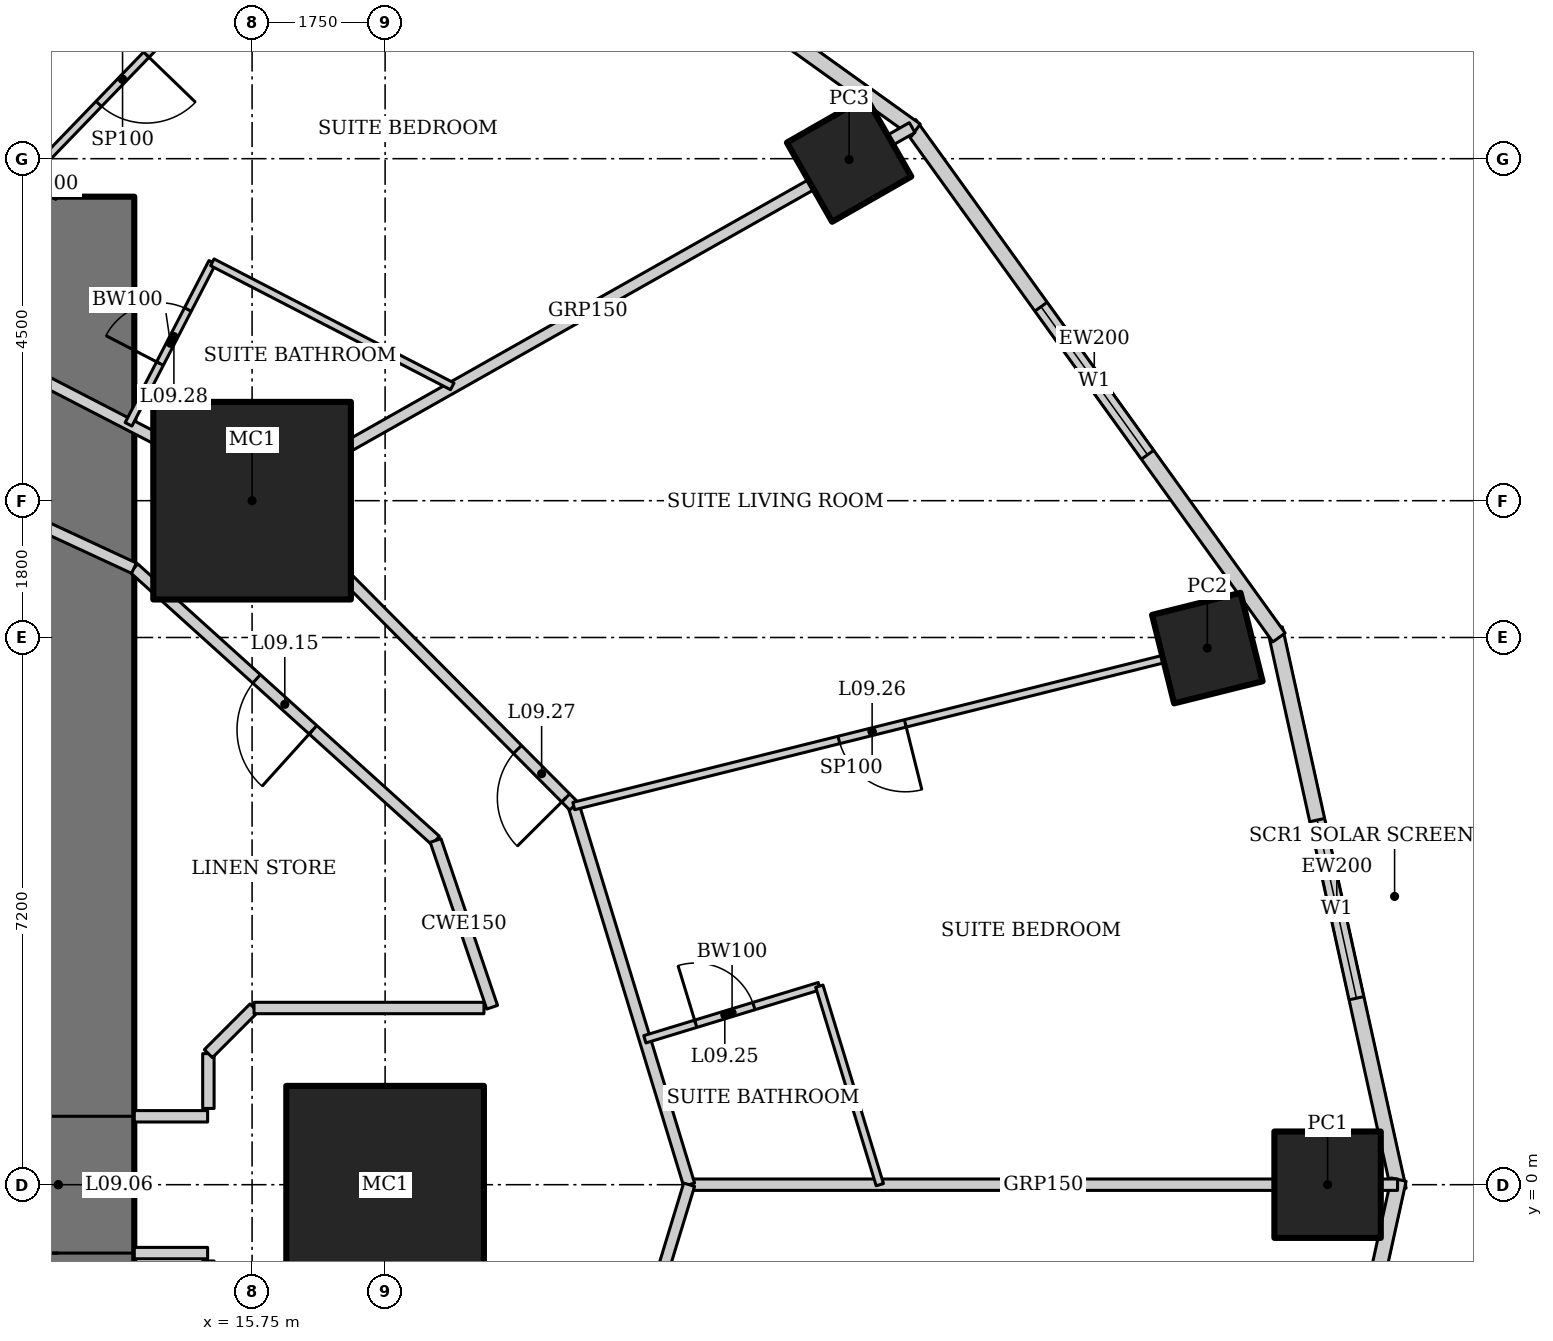
"""IFC4 building model, lengths in metres.
Left out: names, types, materials, properties, quantities, classifications, styles, units other than length and angle.
Written with IfcOpenShell. Run it as: python <this file> out.ifc"""

import sys

from ifc_helpers import new_model, si_unit, direction, frame, frame_2d, origin, origin_2d, place, context, subcontext, project, spatial, rectangle, hollow_rectangle, extrude, element, fill, save


model = new_model("IFC4")
c1 = context("Model", 3, precision=1e-05, world=origin(), true_north=direction((0.0, 1.0)))
c2 = subcontext(c1, "Body", "Model", "MODEL_VIEW")
j1 = project(units=[si_unit("LENGTHUNIT", "METRE"), si_unit("PLANEANGLEUNIT", "RADIAN")], contexts=[c1])
p1 = place(None, origin())
s1 = spatial("IfcSite", under=j1, at=p1, CompositionType="ELEMENT")
p2 = place(p1, origin())
s2 = spatial("IfcBuilding", under=s1, at=p2, CompositionType="ELEMENT")
p3 = place(p2, frame((0.0, 0.0, 47.8)))
s3 = spatial("IfcBuildingStorey", under=s2, at=p3, CompositionType="ELEMENT", Elevation=47.8)
for number, where, z_axis, x_axis in (
    (1, (17.5, 0.0, 0.0), (0.0, 0.0, 1.0), (1.0, 0.0, 0.0)),
    (2, (15.75, 9.0, 0.0), (0.0, 0.0, 1.0), (1.0, 0.0, 0.0)),
):
    element("IfcColumn", number, at=place(p3, frame(where, z_axis=z_axis, x_axis=x_axis)), inside=s3, PredefinedType="COLUMN", context=c2, shape_type="SweptSolid", body=[
        extrude(hollow_rectangle(XDim=2.6, YDim=2.6, WallThickness=0.13, at=origin_2d()), origin(), (0.0, 0.0, 1.0), 3.6),
    ])
p4 = place(p3, frame((29.9, 0.0, 0.0), z_axis=(0.0, 0.0, 1.0), x_axis=(1.0, 0.0, 0.0)))
e3 = element("IfcColumn", 3, at=p4, inside=s3, PredefinedType="COLUMN", context=c2, shape_type="SweptSolid", body=[
    extrude(hollow_rectangle(XDim=1.4, YDim=1.4, WallThickness=0.1, at=origin_2d()), origin(), (0.0, 0.0, 1.0), 3.6),
])
p5 = place(p3, frame((28.318, 7.06, 0.0), z_axis=(0.0, 0.0, 1.0), x_axis=(0.970295726276, 0.2419218956, 0.0)))
e4 = element("IfcColumn", 4, at=p5, inside=s3, PredefinedType="COLUMN", context=c2, shape_type="SweptSolid", body=[
    extrude(hollow_rectangle(XDim=1.2, YDim=1.2, WallThickness=0.1, at=origin_2d()), origin(), (0.0, 0.0, 1.0), 3.6),
])
p6 = place(p3, frame((23.605, 13.489, 0.0), z_axis=(0.0, 0.0, 1.0), x_axis=(0.86824298017, 0.496139221777, 0.0)))
e5 = element("IfcColumn", 5, at=p6, inside=s3, PredefinedType="COLUMN", context=c2, shape_type="SweptSolid", body=[
    extrude(hollow_rectangle(XDim=1.2, YDim=1.2, WallThickness=0.12, at=origin_2d()), origin(), (0.0, 0.0, 1.0), 3.6),
])
p7 = place(p3, frame((13.2, -13.0, 0.0), z_axis=(0.0, 0.0, 1.0), x_axis=(0.0, 1.0, 0.0)))
e6 = element("IfcWall", 6, at=p7, inside=s3, PredefinedType="SHEAR", context=c2, shape_type="SweptSolid", body=[
    extrude(rectangle(XDim=26.0, YDim=2.0, at=frame_2d((13.0, 0.0))), origin(), (0.0, 0.0, 1.0), 3.6),
])
p8 = place(p7, frame((12.1, 0.0, 0.0)))
e7 = element("IfcOpeningElement", 7, at=p8, cuts=e6, PredefinedType="OPENING", context=c2, shape_type="SweptSolid", body=[
    extrude(rectangle(XDim=1.8, YDim=2.1, at=frame_2d((0.9, 1.05))), frame((0.0, 1.01, 0.0), z_axis=(0.0, -1.0, 0.0), x_axis=(1.0, 0.0, 0.0)), (0.0, 0.0, 1.0), 2.02),
])
p9 = place(p3, frame((30.835, -0.067, 0.0), z_axis=(0.0, 0.0, 1.0), x_axis=(-0.215238065514, 0.976561608478, 0.0)))
e8 = element("IfcWall", 8, at=p9, inside=s3, PredefinedType="SOLIDWALL", context=c2, shape_type="SweptSolid", body=[
    extrude(rectangle(XDim=7.562, YDim=0.2, at=frame_2d((3.781, 0.0))), origin(), (0.0, 0.0, 1.0), 3.45),
])
p10 = place(p9, frame((2.581, 0.0, 0.5)))
e9 = element("IfcOpeningElement", 9, at=p10, cuts=e8, PredefinedType="OPENING", context=c2, shape_type="SweptSolid", body=[
    extrude(rectangle(XDim=2.4, YDim=2.2, at=frame_2d((1.2, 1.1))), frame((0.0, 0.11, 0.0), z_axis=(0.0, -1.0, 0.0), x_axis=(1.0, 0.0, 0.0)), (0.0, 0.0, 1.0), 0.22),
])
p11 = place(p3, frame((29.26, 7.2, 0.0), z_axis=(0.0, 0.0, 1.0), x_axis=(-0.583937613703, 0.811798536155, 0.0)))
e10 = element("IfcWall", 10, at=p11, inside=s3, PredefinedType="SOLIDWALL", context=c2, shape_type="SweptSolid", body=[
    extrude(rectangle(XDim=8.323, YDim=0.2, at=frame_2d((4.162, 0.0))), origin(), (0.0, 0.0, 1.0), 3.45),
])
p12 = place(p11, frame((2.961, 0.0, 0.5)))
e11 = element("IfcOpeningElement", 11, at=p12, cuts=e10, PredefinedType="OPENING", context=c2, shape_type="SweptSolid", body=[
    extrude(rectangle(XDim=2.4, YDim=2.2, at=frame_2d((1.2, 1.1))), frame((0.0, 0.11, 0.0), z_axis=(0.0, -1.0, 0.0), x_axis=(1.0, 0.0, 0.0)), (0.0, 0.0, 1.0), 0.22),
])
p13 = place(p3, frame((24.482, 13.875, 0.0), z_axis=(0.0, 0.0, 1.0), x_axis=(-0.812791321576, 0.582554948112, 0.0)))
e12 = element("IfcWall", 12, at=p13, inside=s3, PredefinedType="SOLIDWALL", context=c2, shape_type="SweptSolid", body=[
    extrude(rectangle(XDim=8.063, YDim=0.2, at=frame_2d((4.032, 0.0))), origin(), (0.0, 0.0, 1.0), 3.45),
])
p14 = place(p13, frame((2.832, 0.0, 0.5)))
e13 = element("IfcOpeningElement", 13, at=p14, cuts=e12, PredefinedType="OPENING", context=c2, shape_type="SweptSolid", body=[
    extrude(rectangle(XDim=2.4, YDim=2.2, at=frame_2d((1.2, 1.1))), frame((0.0, 0.11, 0.0), z_axis=(0.0, -1.0, 0.0), x_axis=(1.0, 0.0, 0.0)), (0.0, 0.0, 1.0), 0.22),
])
p15 = place(p3, frame((29.208, -7.318, 0.0), z_axis=(0.0, 0.0, 1.0), x_axis=(0.215238065514, 0.976561608478, 0.0)))
e14 = element("IfcWall", 14, at=p15, inside=s3, PredefinedType="SOLIDWALL", context=c2, shape_type="SweptSolid", body=[
    extrude(rectangle(XDim=7.562, YDim=0.2, at=frame_2d((3.781, 0.0))), origin(), (0.0, 0.0, 1.0), 3.45),
])
p16 = place(p15, frame((2.581, 0.0, 0.5)))
e15 = element("IfcOpeningElement", 15, at=p16, cuts=e14, PredefinedType="OPENING", context=c2, shape_type="SweptSolid", body=[
    extrude(rectangle(XDim=2.4, YDim=2.2, at=frame_2d((1.2, 1.1))), frame((0.0, 0.11, 0.0), z_axis=(0.0, -1.0, 0.0), x_axis=(1.0, 0.0, 0.0)), (0.0, 0.0, 1.0), 0.22),
])
p17 = place(p3, frame((30.821, 0.0, 0.0), z_axis=(0.0, 0.0, 1.0), x_axis=(-1.0, 0.0, 0.0)))
e16 = element("IfcWall", 16, at=p17, inside=s3, PredefinedType="PARTITIONING", context=c2, shape_type="SweptSolid", body=[
    extrude(rectangle(XDim=9.321, YDim=0.15, at=frame_2d((4.66, 0.0))), origin(), (0.0, 0.0, 1.0), 2.528),
])
p18 = place(p3, frame((24.435, 13.909, 0.0), z_axis=(0.0, 0.0, 1.0), x_axis=(-0.870612006791, -0.491970256856, 0.0)))
e17 = element("IfcWall", 17, at=p18, inside=s3, PredefinedType="PARTITIONING", context=c2, shape_type="SweptSolid", body=[
    extrude(rectangle(XDim=9.802, YDim=0.15, at=frame_2d((4.901, 0.0))), origin(), (0.0, 0.0, 1.0), 2.693),
])
p19 = place(p3, frame((21.5, 0.0, 0.0), z_axis=(0.0, 0.0, 1.0), x_axis=(-0.291383581394, 0.95660629754, 0.0)))
e18 = element("IfcWall", 18, at=p19, inside=s3, PredefinedType="PARTITIONING", context=c2, shape_type="SweptSolid", body=[
    extrude(rectangle(XDim=5.208, YDim=0.15, at=frame_2d((2.604, 0.0))), origin(), (0.0, 0.0, 1.0), 3.45),
])
p20 = place(p3, frame((19.982, 4.982, 0.0), z_axis=(0.0, 0.0, 1.0), x_axis=(-0.705121546414, 0.709086457904, 0.0)))
e19 = element("IfcWall", 19, at=p20, inside=s3, PredefinedType="PARTITIONING", context=c2, shape_type="SweptSolid", body=[
    extrude(rectangle(XDim=5.788, YDim=0.15, at=frame_2d((2.894, 0.0))), origin(), (0.0, 0.0, 1.0), 3.45),
])
p21 = place(p20, frame((0.15, 0.0, 0.0)))
e20 = element("IfcOpeningElement", 20, at=p21, cuts=e19, PredefinedType="OPENING", context=c2, shape_type="SweptSolid", body=[
    extrude(rectangle(XDim=0.9, YDim=2.1, at=frame_2d((0.45, 1.05))), frame((0.0, 0.085, 0.0), z_axis=(0.0, -1.0, 0.0), x_axis=(1.0, 0.0, 0.0)), (0.0, 0.0, 1.0), 0.17),
])
p22 = place(p3, frame((15.901, 9.086, 0.0), z_axis=(0.0, 0.0, 1.0), x_axis=(-0.888333171507, 0.459199495209, 0.0)))
e21 = element("IfcWall", 21, at=p22, inside=s3, PredefinedType="PARTITIONING", context=c2, shape_type="SweptSolid", body=[
    extrude(rectangle(XDim=5.351, YDim=0.15, at=frame_2d((2.676, 0.0))), origin(), (0.0, 0.0, 1.0), 3.45),
])
p23 = place(p3, frame((19.982, -4.982, 0.0), z_axis=(0.0, 0.0, 1.0), x_axis=(0.291383581394, 0.95660629754, 0.0)))
e22 = element("IfcWall", 22, at=p23, inside=s3, PredefinedType="PARTITIONING", context=c2, shape_type="SweptSolid", body=[
    extrude(rectangle(XDim=5.208, YDim=0.15, at=frame_2d((2.604, 0.0))), origin(), (0.0, 0.0, 1.0), 3.45),
])
p24 = place(p23, frame((0.15, 0.0, 0.0)))
e23 = element("IfcOpeningElement", 23, at=p24, cuts=e22, PredefinedType="OPENING", context=c2, shape_type="SweptSolid", body=[
    extrude(rectangle(XDim=0.9, YDim=2.1, at=frame_2d((0.45, 1.05))), frame((0.0, 0.085, 0.0), z_axis=(0.0, -1.0, 0.0), x_axis=(1.0, 0.0, 0.0)), (0.0, 0.0, 1.0), 0.17),
])
p25 = place(p3, frame((18.164, 4.529, 0.0), z_axis=(0.0, 0.0, 1.0), x_axis=(-0.742194222, 0.670184852731, 0.0)))
e24 = element("IfcWall", 24, at=p25, inside=s3, PredefinedType="PARTITIONING", context=c2, shape_type="SweptSolid", body=[
    extrude(rectangle(XDim=5.347, YDim=0.15, at=frame_2d((2.673, 0.0))), origin(), (0.0, 0.0, 1.0), 3.45),
])
p26 = place(p25, frame((2.173, 0.0, 0.0)))
e25 = element("IfcOpeningElement", 25, at=p26, cuts=e24, PredefinedType="OPENING", context=c2, shape_type="SweptSolid", body=[
    extrude(rectangle(XDim=1.0, YDim=2.1, at=frame_2d((0.5, 1.05))), frame((0.0, 0.085, 0.0), z_axis=(0.0, -1.0, 0.0), x_axis=(1.0, 0.0, 0.0)), (0.0, 0.0, 1.0), 0.17),
])
p27 = place(p3, frame((14.196, 8.112, 0.0), z_axis=(0.0, 0.0, 1.0), x_axis=(-0.907279653965, 0.420527798727, 0.0)))
e26 = element("IfcWall", 26, at=p27, inside=s3, PredefinedType="PARTITIONING", context=c2, shape_type="SweptSolid", body=[
    extrude(rectangle(XDim=4.844, YDim=0.15, at=frame_2d((2.422, 0.0))), origin(), (0.0, 0.0, 1.0), 3.45),
])
p28 = place(p3, frame((20.917, 1.913, 0.0), z_axis=(0.0, 0.0, 1.0), x_axis=(0.956591303063, 0.291432803411, 0.0)))
e27 = element("IfcWall", 27, at=p28, inside=s3, PredefinedType="PARTITIONING", context=c2, shape_type="SweptSolid", body=[
    extrude(rectangle(XDim=2.4, YDim=0.1, at=frame_2d((1.2, 0.0))), origin(), (0.0, 0.0, 1.0), 3.45),
])
p29 = place(p28, frame((0.7, 0.0, 0.0)))
e28 = element("IfcOpeningElement", 28, at=p29, cuts=e27, PredefinedType="OPENING", context=c2, shape_type="SweptSolid", body=[
    extrude(rectangle(XDim=0.8, YDim=2.1, at=frame_2d((0.4, 1.05))), frame((0.0, 0.06, 0.0), z_axis=(0.0, -1.0, 0.0), x_axis=(1.0, 0.0, 0.0)), (0.0, 0.0, 1.0), 0.12),
])
p30 = place(p3, frame((23.213, 2.613, 0.0), z_axis=(0.0, 0.0, 1.0), x_axis=(0.291339473488, -0.956619731757, 0.0)))
e29 = element("IfcWall", 29, at=p30, inside=s3, PredefinedType="PARTITIONING", context=c2, shape_type="SweptSolid", body=[
    extrude(rectangle(XDim=2.731, YDim=0.1, at=frame_2d((1.365, 0.0))), origin(), (0.0, 0.0, 1.0), 3.45),
])
p31 = place(p3, frame((27.833, 6.939, 0.0), z_axis=(0.0, 0.0, 1.0), x_axis=(-0.97029673161, -0.24191786339, 0.0)))
e30 = element("IfcWall", 30, at=p31, inside=s3, PredefinedType="PARTITIONING", context=c2, shape_type="SweptSolid", body=[
    extrude(rectangle(XDim=8.091, YDim=0.1, at=frame_2d((4.045, 0.0))), origin(), (0.0, 0.0, 1.0), 2.332),
])
p32 = place(p31, frame((3.595, 0.0, 0.0)))
e31 = element("IfcOpeningElement", 31, at=p32, cuts=e30, PredefinedType="OPENING", context=c2, shape_type="SweptSolid", body=[
    extrude(rectangle(XDim=0.9, YDim=2.1, at=frame_2d((0.45, 1.05))), frame((0.0, 0.06, 0.0), z_axis=(0.0, -1.0, 0.0), x_axis=(1.0, 0.0, 0.0)), (0.0, 0.0, 1.0), 0.12),
])
p33 = place(p3, frame((14.125, 10.005, 0.0), z_axis=(0.0, 0.0, 1.0), x_axis=(0.459218106657, 0.888323550582, 0.0)))
e32 = element("IfcWall", 32, at=p33, inside=s3, PredefinedType="PARTITIONING", context=c2, shape_type="SweptSolid", body=[
    extrude(rectangle(XDim=2.4, YDim=0.1, at=frame_2d((1.2, 0.0))), origin(), (0.0, 0.0, 1.0), 3.45),
])
p34 = place(p33, frame((0.9, 0.0, 0.0)))
e33 = element("IfcOpeningElement", 33, at=p34, cuts=e32, PredefinedType="OPENING", context=c2, shape_type="SweptSolid", body=[
    extrude(rectangle(XDim=0.8, YDim=2.1, at=frame_2d((0.4, 1.05))), frame((0.0, 0.06, 0.0), z_axis=(0.0, -1.0, 0.0), x_axis=(1.0, 0.0, 0.0)), (0.0, 0.0, 1.0), 0.12),
])
p35 = place(p3, frame((15.227, 12.137, 0.0), z_axis=(0.0, 0.0, 1.0), x_axis=(0.888342312029, -0.459181812204, 0.0)))
e34 = element("IfcWall", 34, at=p35, inside=s3, PredefinedType="PARTITIONING", context=c2, shape_type="SweptSolid", body=[
    extrude(rectangle(XDim=3.554, YDim=0.1, at=frame_2d((1.777, 0.0))), origin(), (0.0, 0.0, 1.0), 3.45),
])
p36 = place(p3, frame((16.944, 17.545, 0.0), z_axis=(0.0, 0.0, 1.0), x_axis=(-0.694680670522, -0.71931826475, 0.0)))
e35 = element("IfcWall", 35, at=p36, inside=s3, PredefinedType="PARTITIONING", context=c2, shape_type="SweptSolid", body=[
    extrude(rectangle(XDim=8.344, YDim=0.1, at=frame_2d((4.172, 0.0))), origin(), (0.0, 0.0, 1.0), 2.528),
])
p37 = place(p36, frame((3.722, 0.0, 0.0)))
e36 = element("IfcOpeningElement", 36, at=p37, cuts=e35, PredefinedType="OPENING", context=c2, shape_type="SweptSolid", body=[
    extrude(rectangle(XDim=0.9, YDim=2.1, at=frame_2d((0.45, 1.05))), frame((0.0, 0.06, 0.0), z_axis=(0.0, -1.0, 0.0), x_axis=(1.0, 0.0, 0.0)), (0.0, 0.0, 1.0), 0.12),
])
p38 = place(p3, frame((13.2, 13.0, 0.0), z_axis=(0.0, 0.0, 1.0), x_axis=(-0.719347134512, 0.69465077562, 0.0)))
e37 = element("IfcWall", 37, at=p38, inside=s3, PredefinedType="PARTITIONING", context=c2, shape_type="SweptSolid", body=[
    extrude(rectangle(XDim=0.465, YDim=0.1, at=frame_2d((0.232, 0.0))), origin(), (0.0, 0.0, 1.0), 3.45),
])
p39 = place(p3, frame((18.908, 2.335, 0.0), z_axis=(0.0, 0.0, 1.0), x_axis=(-0.321124194945, 0.947037090837, 0.0)))
e38 = element("IfcWall", 38, at=p39, inside=s3, PredefinedType="PARTITIONING", context=c2, shape_type="SweptSolid", body=[
    extrude(rectangle(XDim=2.317, YDim=0.15, at=frame_2d((1.158, 0.0))), origin(), (0.0, 0.0, 1.0), 3.45),
])
for number, where, z_axis, x_axis in (
    (39, (14.2, -0.9, 0.0), (0.0, 0.0, 1.0), (1.0, 0.0, 0.0)),
    (40, (14.2, 0.9, 0.0), (0.0, 0.0, 1.0), (1.0, 0.0, 0.0)),
):
    element("IfcWall", number, at=place(p3, frame(where, z_axis=z_axis, x_axis=x_axis)), inside=s3, PredefinedType="PARTITIONING", context=c2, shape_type="SweptSolid", body=[
        extrude(rectangle(XDim=0.965, YDim=0.15, at=frame_2d((0.482, 0.0))), origin(), (0.0, 0.0, 1.0), 3.45),
    ])
p40 = place(p3, frame((15.175, 1.003, 0.0), z_axis=(0.0, 0.0, 1.0), x_axis=(0.0, 1.0, 0.0)))
e41 = element("IfcWall", 41, at=p40, inside=s3, PredefinedType="PARTITIONING", context=c2, shape_type="SweptSolid", body=[
    extrude(rectangle(XDim=0.721, YDim=0.15, at=frame_2d((0.361, 0.0))), origin(), (0.0, 0.0, 1.0), 3.45),
])
p41 = place(p3, frame((15.175, 1.725, 0.0), z_axis=(0.0, 0.0, 1.0), x_axis=(0.707106781187, 0.707106781187, 0.0)))
e42 = element("IfcWall", 42, at=p41, inside=s3, PredefinedType="PARTITIONING", context=c2, shape_type="SweptSolid", body=[
    extrude(rectangle(XDim=0.849, YDim=0.15, at=frame_2d((0.425, 0.0))), origin(), (0.0, 0.0, 1.0), 3.45),
])
p42 = place(p3, frame((15.775, 2.325, 0.0), z_axis=(0.0, 0.0, 1.0), x_axis=(1.0, 0.0, 0.0)))
e43 = element("IfcWall", 43, at=p42, inside=s3, PredefinedType="PARTITIONING", context=c2, shape_type="SweptSolid", body=[
    extrude(rectangle(XDim=3.025, YDim=0.15, at=frame_2d((1.513, 0.0))), origin(), (0.0, 0.0, 1.0), 3.45),
])
p43 = place(p10, origin())
e44 = element("IfcWindow", 44, at=p43, inside=s3, PartitioningType="SINGLE_PANEL", PredefinedType="WINDOW", context=c2, shape_type="SweptSolid", body=[
    extrude(rectangle(XDim=2.4, YDim=2.2, at=frame_2d((1.2, 1.1))), frame((0.0, 0.03, 0.0), z_axis=(0.0, -1.0, 0.0), x_axis=(1.0, 0.0, 0.0)), (0.0, 0.0, 1.0), 0.06),
])
fill(e9, e44)
p44 = place(p12, origin())
e45 = element("IfcWindow", 45, at=p44, inside=s3, PartitioningType="SINGLE_PANEL", PredefinedType="WINDOW", context=c2, shape_type="SweptSolid", body=[
    extrude(rectangle(XDim=2.4, YDim=2.2, at=frame_2d((1.2, 1.1))), frame((0.0, 0.03, 0.0), z_axis=(0.0, -1.0, 0.0), x_axis=(1.0, 0.0, 0.0)), (0.0, 0.0, 1.0), 0.06),
])
fill(e11, e45)
p45 = place(p8, origin())
e46 = element("IfcDoor", 46, at=p45, inside=s3, OperationType="DOUBLE_DOOR_DOUBLE_SWING", PredefinedType="DOOR", context=c2, shape_type="SweptSolid", body=[
    extrude(rectangle(XDim=1.8, YDim=2.1, at=frame_2d((0.9, 1.05))), frame((0.0, 0.025, 0.0), z_axis=(0.0, -1.0, 0.0), x_axis=(1.0, 0.0, 0.0)), (0.0, 0.0, 1.0), 0.05),
])
fill(e7, e46)
p46 = place(p26, origin())
e47 = element("IfcDoor", 47, at=p46, inside=s3, OperationType="SINGLE_SWING_LEFT", PredefinedType="DOOR", context=c2, shape_type="SweptSolid", body=[
    extrude(rectangle(XDim=1.0, YDim=2.1, at=frame_2d((0.5, 1.05))), frame((0.0, 0.025, 0.0), z_axis=(0.0, -1.0, 0.0), x_axis=(1.0, 0.0, 0.0)), (0.0, 0.0, 1.0), 0.05),
])
fill(e25, e47)
p47 = place(p29, origin())
e48 = element("IfcDoor", 48, at=p47, inside=s3, OperationType="SINGLE_SWING_LEFT", PredefinedType="DOOR", context=c2, shape_type="SweptSolid", body=[
    extrude(rectangle(XDim=0.8, YDim=2.1, at=frame_2d((0.4, 1.05))), frame((0.0, 0.025, 0.0), z_axis=(0.0, -1.0, 0.0), x_axis=(1.0, 0.0, 0.0)), (0.0, 0.0, 1.0), 0.05),
])
fill(e28, e48)
p48 = place(p32, origin())
e49 = element("IfcDoor", 49, at=p48, inside=s3, OperationType="SINGLE_SWING_LEFT", PredefinedType="DOOR", context=c2, shape_type="SweptSolid", body=[
    extrude(rectangle(XDim=0.9, YDim=2.1, at=frame_2d((0.45, 1.05))), frame((0.0, 0.025, 0.0), z_axis=(0.0, -1.0, 0.0), x_axis=(1.0, 0.0, 0.0)), (0.0, 0.0, 1.0), 0.05),
])
fill(e31, e49)
p49 = place(p21, origin())
e50 = element("IfcDoor", 50, at=p49, inside=s3, OperationType="SINGLE_SWING_LEFT", PredefinedType="DOOR", context=c2, shape_type="SweptSolid", body=[
    extrude(rectangle(XDim=0.9, YDim=2.1, at=frame_2d((0.45, 1.05))), frame((0.0, 0.025, 0.0), z_axis=(0.0, -1.0, 0.0), x_axis=(1.0, 0.0, 0.0)), (0.0, 0.0, 1.0), 0.05),
])
fill(e20, e50)
p50 = place(p34, origin())
e51 = element("IfcDoor", 51, at=p50, inside=s3, OperationType="SINGLE_SWING_LEFT", PredefinedType="DOOR", context=c2, shape_type="SweptSolid", body=[
    extrude(rectangle(XDim=0.8, YDim=2.1, at=frame_2d((0.4, 1.05))), frame((0.0, 0.025, 0.0), z_axis=(0.0, -1.0, 0.0), x_axis=(1.0, 0.0, 0.0)), (0.0, 0.0, 1.0), 0.05),
])
fill(e33, e51)
p51 = place(p37, origin())
e52 = element("IfcDoor", 52, at=p51, inside=s3, OperationType="SINGLE_SWING_LEFT", PredefinedType="DOOR", context=c2, shape_type="SweptSolid", body=[
    extrude(rectangle(XDim=0.9, YDim=2.1, at=frame_2d((0.45, 1.05))), frame((0.0, 0.025, 0.0), z_axis=(0.0, -1.0, 0.0), x_axis=(1.0, 0.0, 0.0)), (0.0, 0.0, 1.0), 0.05),
])
fill(e36, e52)
save(model, sys.argv[1])
